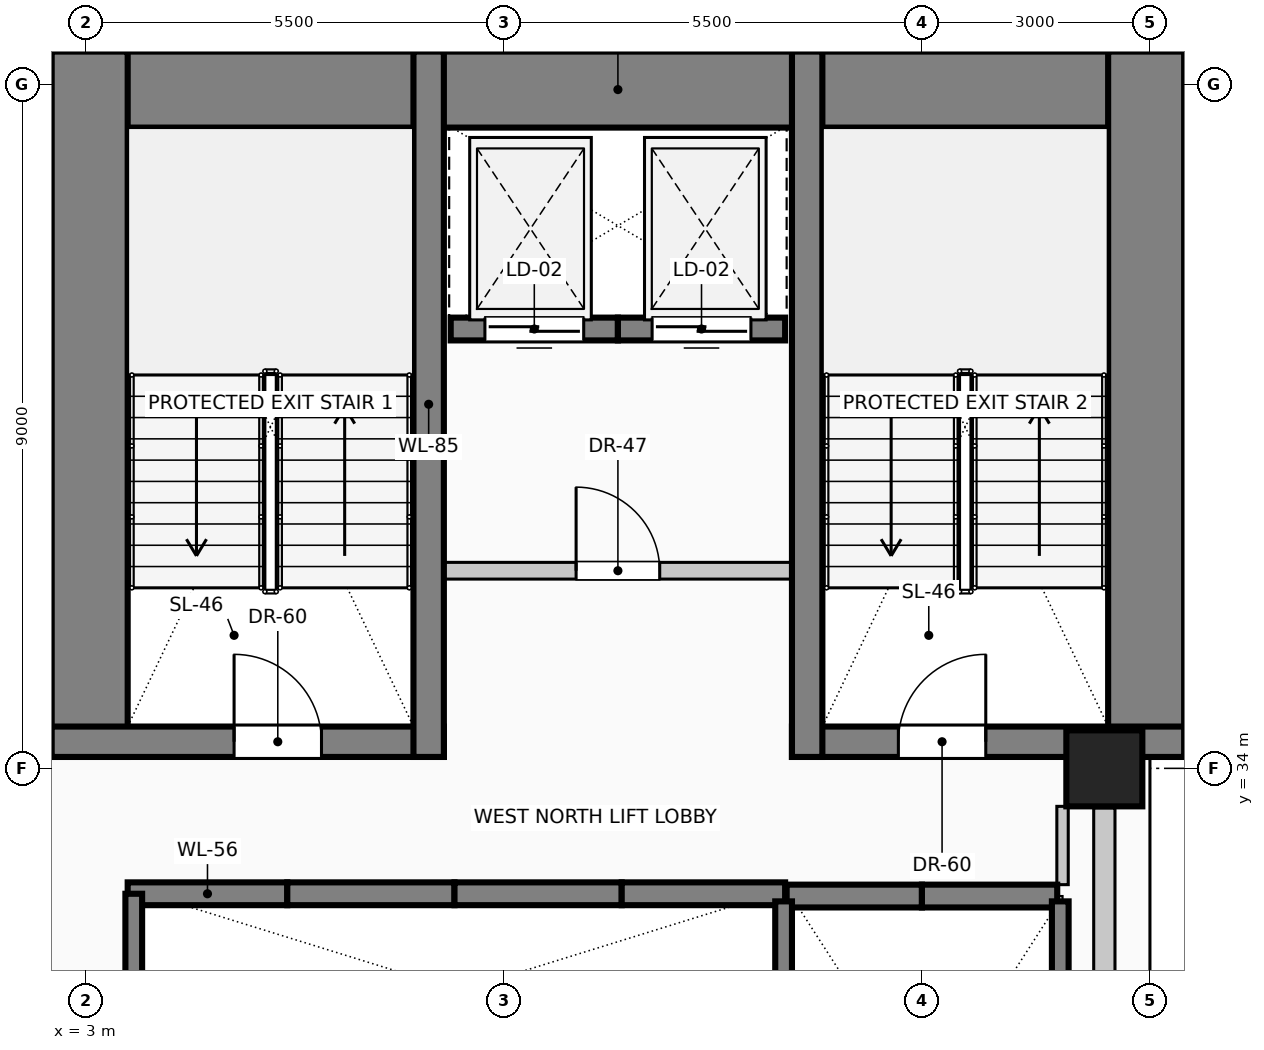
"""IFC4 building model, lengths in metres.
Left out: names, types, materials, properties, quantities, classifications, styles, units other than length and angle.
Written with IfcOpenShell. Run it as: python <this file> out.ifc"""

import sys

from ifc_helpers import new_model, si_unit, direction, frame, frame_2d, origin, origin_2d, place, context, subcontext, project, spatial, rectangle, circle, extrude, element, fill, save


model = new_model("IFC4")
c1 = context("Model", 3, precision=1e-05, world=origin(), true_north=direction((0.0, 1.0)))
c2 = subcontext(c1, "Body", "Model", "MODEL_VIEW")
j1 = project(units=[si_unit("LENGTHUNIT", "METRE"), si_unit("PLANEANGLEUNIT", "RADIAN")], contexts=[c1])
p1 = place(None, origin())
s1 = spatial("IfcSite", under=j1, at=p1, CompositionType="ELEMENT")
p2 = place(p1, origin())
s2 = spatial("IfcBuilding", under=s1, at=p2, CompositionType="ELEMENT")
p3 = place(p2, frame((0.0, 0.0, 34.6)))
s3 = spatial("IfcBuildingStorey", under=s2, at=p3, CompositionType="ELEMENT", Elevation=34.6)
p4 = place(p3, frame((2.55, 42.93, 0.0), z_axis=(0.0, 0.0, 1.0), x_axis=(1.0, 0.0, 0.0)))
e1 = element("IfcWall", 1, at=p4, inside=s3, PredefinedType="SHEAR", context=c2, shape_type="SweptSolid", body=[
    extrude(rectangle(XDim=14.9, YDim=1.0, at=frame_2d((7.45, 0.0))), origin(), (0.0, 0.0, 1.0), 4.0),
])
for number, where, z_axis, x_axis in (
    (2, (3.05, 34.15, 0.0), (0.0, 0.0, 1.0), (0.0, 1.0, 0.0)),
    (3, (16.95, 34.15, 0.0), (0.0, 0.0, 1.0), (0.0, 1.0, 0.0)),
):
    element("IfcWall", number, at=place(p3, frame(where, z_axis=z_axis, x_axis=x_axis)), inside=s3, PredefinedType="SHEAR", context=c2, shape_type="SweptSolid", body=[
        extrude(rectangle(XDim=9.28, YDim=1.0, at=frame_2d((4.64, 0.0))), origin(), (0.0, 0.0, 1.0), 4.0),
    ])
p5 = place(p3, frame((2.55, 34.35, 0.0), z_axis=(0.0, 0.0, 1.0), x_axis=(1.0, 0.0, 0.0)))
e4 = element("IfcWall", 4, at=p5, inside=s3, PredefinedType="SHEAR", context=c2, shape_type="SweptSolid", body=[
    extrude(rectangle(XDim=5.16, YDim=0.4, at=frame_2d((2.58, 0.0))), origin(), (0.0, 0.0, 1.0), 4.0),
])
p6 = place(p5, frame((2.4, 0.0, 0.0)))
e5 = element("IfcOpeningElement", 5, at=p6, cuts=e4, PredefinedType="OPENING", context=c2, shape_type="SweptSolid", body=[
    extrude(rectangle(XDim=1.15, YDim=2.2, at=frame_2d((0.575, 1.1))), frame((0.0, 0.21, 0.0), z_axis=(0.0, -1.0, 0.0), x_axis=(1.0, 0.0, 0.0)), (0.0, 0.0, 1.0), 0.42),
])
p7 = place(p3, frame((12.29, 34.35, 0.0), z_axis=(0.0, 0.0, 1.0), x_axis=(1.0, 0.0, 0.0)))
e6 = element("IfcWall", 6, at=p7, inside=s3, PredefinedType="SHEAR", context=c2, shape_type="SweptSolid", body=[
    extrude(rectangle(XDim=5.16, YDim=0.4, at=frame_2d((2.58, 0.0))), origin(), (0.0, 0.0, 1.0), 4.0),
])
p8 = place(p7, frame((1.4, 0.0, 0.0)))
e7 = element("IfcOpeningElement", 7, at=p8, cuts=e6, PredefinedType="OPENING", context=c2, shape_type="SweptSolid", body=[
    extrude(rectangle(XDim=1.15, YDim=2.2, at=frame_2d((0.575, 1.1))), frame((0.0, 0.21, 0.0), z_axis=(0.0, -1.0, 0.0), x_axis=(1.0, 0.0, 0.0)), (0.0, 0.0, 1.0), 0.42),
])
for number, where, z_axis, x_axis in (
    (8, (7.51, 34.15, 0.0), (0.0, 0.0, 1.0), (0.0, 1.0, 0.0)),
    (9, (12.49, 34.15, 0.0), (0.0, 0.0, 1.0), (0.0, 1.0, 0.0)),
):
    element("IfcWall", number, at=place(p3, frame(where, z_axis=z_axis, x_axis=x_axis)), inside=s3, PredefinedType="SHEAR", context=c2, shape_type="SweptSolid", body=[
        extrude(rectangle(XDim=9.28, YDim=0.4, at=frame_2d((4.64, 0.0))), origin(), (0.0, 0.0, 1.0), 4.0),
    ])
p9 = place(p3, frame((16.4, 34.0, 0.0), z_axis=(0.0, 0.0, 1.0), x_axis=(1.0, 0.0, 0.0)))
e10 = element("IfcColumn", 10, at=p9, inside=s3, PredefinedType="COLUMN", context=c2, shape_type="SweptSolid", body=[
    extrude(circle(Radius=0.5, at=origin_2d()), origin(), (0.0, 0.0, 1.0), 4.0),
])
p10 = place(p3, frame((16.4, 33.48, 0.0), z_axis=(0.0, 0.0, 1.0), x_axis=(0.0, -1.0, 0.0)))
e11 = element("IfcWall", 11, at=p10, inside=s3, PredefinedType="SOLIDWALL", context=c2, shape_type="SweptSolid", body=[
    extrude(rectangle(XDim=6.71, YDim=0.28, at=frame_2d((3.355, 0.0))), origin(), (0.0, 0.0, 1.0), 3.0),
])
for number, where, z_axis, x_axis in (
    (12, (12.22, 32.32, 0.0), (0.0, 0.0, 1.0), (1.0, 0.0, 0.0)),
    (13, (14.0, 32.32, 0.0), (0.0, 0.0, 1.0), (1.0, 0.0, 0.0)),
):
    element("IfcWall", number, at=place(p3, frame(where, z_axis=z_axis, x_axis=x_axis)), inside=s3, PredefinedType="SOLIDWALL", context=c2, shape_type="SweptSolid", body=[
        extrude(rectangle(XDim=1.78, YDim=0.3, at=frame_2d((0.89, 0.0))), origin(), (0.0, 0.0, 1.0), 4.0),
    ])
p11 = place(p3, frame((3.55, 32.35, 0.0), z_axis=(0.0, 0.0, 1.0), x_axis=(1.0, 0.0, 0.0)))
e14 = element("IfcWall", 14, at=p11, inside=s3, PredefinedType="SOLIDWALL", context=c2, shape_type="SweptSolid", body=[
    extrude(rectangle(XDim=2.1, YDim=0.3, at=frame_2d((1.05, 0.0))), origin(), (0.0, 0.0, 1.0), 4.0),
])
p12 = place(p3, frame((5.65, 32.35, 0.0), z_axis=(0.0, 0.0, 1.0), x_axis=(1.0, 0.0, 0.0)))
e15 = element("IfcWall", 15, at=p12, inside=s3, PredefinedType="SOLIDWALL", context=c2, shape_type="SweptSolid", body=[
    extrude(rectangle(XDim=2.2, YDim=0.3, at=frame_2d((1.1, 0.0))), origin(), (0.0, 0.0, 1.0), 4.0),
])
p13 = place(p3, frame((7.85, 32.35, 0.0), z_axis=(0.0, 0.0, 1.0), x_axis=(1.0, 0.0, 0.0)))
e16 = element("IfcWall", 16, at=p13, inside=s3, PredefinedType="SOLIDWALL", context=c2, shape_type="SweptSolid", body=[
    extrude(rectangle(XDim=2.2, YDim=0.3, at=frame_2d((1.1, 0.0))), origin(), (0.0, 0.0, 1.0), 4.0),
])
p14 = place(p3, frame((10.05, 32.35, 0.0), z_axis=(0.0, 0.0, 1.0), x_axis=(1.0, 0.0, 0.0)))
e17 = element("IfcWall", 17, at=p14, inside=s3, PredefinedType="SOLIDWALL", context=c2, shape_type="SweptSolid", body=[
    extrude(rectangle(XDim=2.15, YDim=0.3, at=frame_2d((1.075, 0.0))), origin(), (0.0, 0.0, 1.0), 4.0),
])
p15 = place(p3, frame((10.0, 39.78, 0.0), z_axis=(0.0, 0.0, 1.0), x_axis=(-1.0, 0.0, 0.0)))
e18 = element("IfcWall", 18, at=p15, inside=s3, PredefinedType="SOLIDWALL", context=c2, shape_type="SweptSolid", body=[
    extrude(rectangle(XDim=2.2, YDim=0.3, at=frame_2d((1.1, 0.0))), origin(), (0.0, 0.0, 1.0), 4.0),
])
p16 = place(p15, frame((0.45, 0.0, 0.0)))
e19 = element("IfcOpeningElement", 19, at=p16, cuts=e18, PredefinedType="OPENING", context=c2, shape_type="SweptSolid", body=[
    extrude(rectangle(XDim=1.3, YDim=2.25, at=frame_2d((0.65, 1.125))), frame((0.0, 0.16, 0.0), z_axis=(0.0, -1.0, 0.0), x_axis=(1.0, 0.0, 0.0)), (0.0, 0.0, 1.0), 0.32),
])
p17 = place(p3, frame((12.2, 39.78, 0.0), z_axis=(0.0, 0.0, 1.0), x_axis=(-1.0, 0.0, 0.0)))
e20 = element("IfcWall", 20, at=p17, inside=s3, PredefinedType="SOLIDWALL", context=c2, shape_type="SweptSolid", body=[
    extrude(rectangle(XDim=2.2, YDim=0.3, at=frame_2d((1.1, 0.0))), origin(), (0.0, 0.0, 1.0), 4.0),
])
p18 = place(p17, frame((0.45, 0.0, 0.0)))
e21 = element("IfcOpeningElement", 21, at=p18, cuts=e20, PredefinedType="OPENING", context=c2, shape_type="SweptSolid", body=[
    extrude(rectangle(XDim=1.3, YDim=2.25, at=frame_2d((0.65, 1.125))), frame((0.0, 0.16, 0.0), z_axis=(0.0, -1.0, 0.0), x_axis=(1.0, 0.0, 0.0)), (0.0, 0.0, 1.0), 0.32),
])
p19 = place(p3, frame((3.63, 26.8, 0.0), z_axis=(0.0, 0.0, 1.0), x_axis=(0.0, 1.0, 0.0)))
e22 = element("IfcWall", 22, at=p19, inside=s3, PredefinedType="SOLIDWALL", context=c2, shape_type="SweptSolid", body=[
    extrude(rectangle(XDim=5.55, YDim=0.22, at=frame_2d((2.775, 0.0))), origin(), (0.0, 0.0, 1.0), 4.0),
])
for number, where, z_axis, x_axis in (
    (23, (12.18, 26.8, 0.0), (0.0, 0.0, 1.0), (0.0, 1.0, 0.0)),
    (24, (15.82, 26.8, 0.0), (0.0, 0.0, 1.0), (0.0, 1.0, 0.0)),
):
    element("IfcWall", number, at=place(p3, frame(where, z_axis=z_axis, x_axis=x_axis)), inside=s3, PredefinedType="SOLIDWALL", context=c2, shape_type="SweptSolid", body=[
        extrude(rectangle(XDim=5.45, YDim=0.22, at=frame_2d((2.725, 0.0))), origin(), (0.0, 0.0, 1.0), 4.0),
    ])
p20 = place(p3, frame((7.51, 36.6, 0.0), z_axis=(0.0, 0.0, 1.0), x_axis=(1.0, 0.0, 0.0)))
e25 = element("IfcWall", 25, at=p20, inside=s3, PredefinedType="PARTITIONING", context=c2, shape_type="SweptSolid", body=[
    extrude(rectangle(XDim=4.98, YDim=0.22, at=frame_2d((2.49, 0.0))), origin(), (0.0, 0.0, 1.0), 3.7),
])
p21 = place(p20, frame((1.94, 0.0, 0.0)))
e26 = element("IfcOpeningElement", 26, at=p21, cuts=e25, PredefinedType="OPENING", context=c2, shape_type="SweptSolid", body=[
    extrude(rectangle(XDim=1.1, YDim=2.2, at=frame_2d((0.55, 1.1))), frame((0.0, 0.12, 0.0), z_axis=(0.0, -1.0, 0.0), x_axis=(1.0, 0.0, 0.0)), (0.0, 0.0, 1.0), 0.24),
])
p22 = place(p3, frame((15.85, 32.47, 0.0), z_axis=(0.0, 0.0, 1.0), x_axis=(0.0, 1.0, 0.0)))
e27 = element("IfcWall", 27, at=p22, inside=s3, PredefinedType="PARTITIONING", context=c2, shape_type="SweptSolid", body=[
    extrude(rectangle(XDim=1.03, YDim=0.15, at=frame_2d((0.515, 0.0))), origin(), (0.0, 0.0, 1.0), 3.7),
])
p23 = place(p16, origin())
e28 = element("IfcDoor", 28, at=p23, inside=s3, OperationType="SLIDING_TO_LEFT", PredefinedType="DOOR", context=c2, shape_type="SweptSolid", body=[
    extrude(rectangle(XDim=1.3, YDim=2.25, at=frame_2d((0.65, 1.125))), frame((0.0, 0.025, 0.0), z_axis=(0.0, -1.0, 0.0), x_axis=(1.0, 0.0, 0.0)), (0.0, 0.0, 1.0), 0.05),
])
fill(e19, e28)
p24 = place(p18, origin())
e29 = element("IfcDoor", 29, at=p24, inside=s3, OperationType="SLIDING_TO_RIGHT", PredefinedType="DOOR", context=c2, shape_type="SweptSolid", body=[
    extrude(rectangle(XDim=1.3, YDim=2.25, at=frame_2d((0.65, 1.125))), frame((0.0, 0.025, 0.0), z_axis=(0.0, -1.0, 0.0), x_axis=(1.0, 0.0, 0.0)), (0.0, 0.0, 1.0), 0.05),
])
fill(e21, e29)
p25 = place(p6, origin())
e30 = element("IfcDoor", 30, at=p25, inside=s3, OperationType="SINGLE_SWING_LEFT", PredefinedType="DOOR", context=c2, shape_type="SweptSolid", body=[
    extrude(rectangle(XDim=1.15, YDim=2.2, at=frame_2d((0.575, 1.1))), frame((0.0, 0.025, 0.0), z_axis=(0.0, -1.0, 0.0), x_axis=(1.0, 0.0, 0.0)), (0.0, 0.0, 1.0), 0.05),
])
fill(e5, e30)
p26 = place(p8, origin())
e31 = element("IfcDoor", 31, at=p26, inside=s3, OperationType="SINGLE_SWING_RIGHT", PredefinedType="DOOR", context=c2, shape_type="SweptSolid", body=[
    extrude(rectangle(XDim=1.15, YDim=2.2, at=frame_2d((0.575, 1.1))), frame((0.0, 0.025, 0.0), z_axis=(0.0, -1.0, 0.0), x_axis=(1.0, 0.0, 0.0)), (0.0, 0.0, 1.0), 0.05),
])
fill(e7, e31)
p27 = place(p21, origin())
e32 = element("IfcDoor", 32, at=p27, inside=s3, OperationType="SINGLE_SWING_LEFT", PredefinedType="DOOR", context=c2, shape_type="SweptSolid", body=[
    extrude(rectangle(XDim=1.1, YDim=2.2, at=frame_2d((0.55, 1.1))), frame((0.0, 0.025, 0.0), z_axis=(0.0, -1.0, 0.0), x_axis=(1.0, 0.0, 0.0)), (0.0, 0.0, 1.0), 0.05),
])
fill(e26, e32)
save(model, sys.argv[1])
